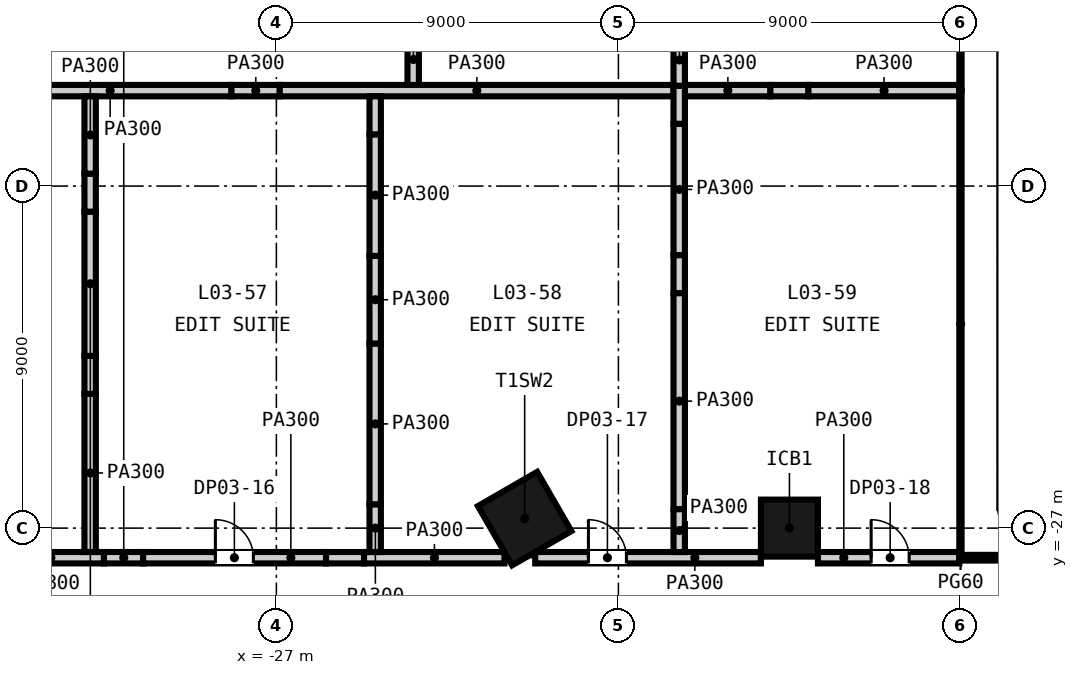
"""IFC4 building model, lengths in metres.
Left out: names, types, materials, properties, quantities, classifications, styles, units other than length and angle.
Written with IfcOpenShell. Run it as: python <this file> out.ifc"""

import sys

from ifc_helpers import new_model, si_unit, direction, frame, frame_2d, origin, origin_2d, place, context, subcontext, project, spatial, rectangle, extrude, element, fill, save


model = new_model("IFC4")
c1 = context("Model", 3, precision=1e-05, world=origin(), true_north=direction((0.0, 1.0)))
c2 = subcontext(c1, "Body", "Model", "MODEL_VIEW")
j1 = project(units=[si_unit("LENGTHUNIT", "METRE"), si_unit("PLANEANGLEUNIT", "RADIAN")], contexts=[c1])
p1 = place(None, origin())
s1 = spatial("IfcSite", under=j1, at=p1, CompositionType="ELEMENT")
p2 = place(p1, origin())
s2 = spatial("IfcBuilding", under=s1, at=p2, CompositionType="ELEMENT")
p3 = place(p2, frame((0.0, 0.0, 22.5)))
s3 = spatial("IfcBuildingStorey", under=s2, at=p3, CompositionType="ELEMENT", Elevation=22.5)
p4 = place(p3, frame((-20.467, -26.75, -0.3), z_axis=(0.0, 0.0, 1.0), x_axis=(0.5, -0.866025403784, 0.0)))
e1 = element("IfcColumn", 1, at=p4, inside=s3, PredefinedType="COLUMN", context=c2, shape_type="SweptSolid", body=[
    extrude(rectangle(XDim=1.8, YDim=1.8, at=origin_2d()), origin(), (0.0, 0.0, 1.0), 4.5),
])
p5 = place(p3, frame((-13.5, -27.0, -0.3), z_axis=(0.0, 0.0, 1.0), x_axis=(1.0, 0.0, 0.0)))
e2 = element("IfcColumn", 2, at=p5, inside=s3, PredefinedType="COLUMN", context=c2, shape_type="SweptSolid", body=[
    extrude(rectangle(XDim=1.5, YDim=1.5, at=origin_2d()), origin(), (0.0, 0.0, 1.0), 4.5),
])
p6 = place(p3, frame((-37.789, -27.779, 0.0), z_axis=(0.0, 0.0, 1.0), x_axis=(1.0, 0.0, 0.0)))
e3 = element("IfcWall", 3, at=p6, inside=s3, PredefinedType="PARTITIONING", context=c2, shape_type="SweptSolid", body=[
    extrude(rectangle(XDim=6.252, YDim=0.3, at=frame_2d((3.126, 0.0))), origin(), (0.0, 0.0, 1.0), 4.2),
])
p7 = place(p6, frame((2.4, 0.0, 0.0)))
e4 = element("IfcOpeningElement", 4, at=p7, cuts=e3, PredefinedType="OPENING", context=c2, shape_type="SweptSolid", body=[
    extrude(rectangle(XDim=1.0, YDim=2.1, at=frame_2d((0.5, 1.05))), frame((0.0, 0.16, 0.0), z_axis=(0.0, -1.0, 0.0), x_axis=(1.0, 0.0, 0.0)), (0.0, 0.0, 1.0), 0.32),
])
p8 = place(p3, frame((-31.537, -27.779, 0.0), z_axis=(0.0, 0.0, 1.0), x_axis=(1.0, 0.0, 0.0)))
e5 = element("IfcWall", 5, at=p8, inside=s3, PredefinedType="PARTITIONING", context=c2, shape_type="SweptSolid", body=[
    extrude(rectangle(XDim=1.032, YDim=0.3, at=frame_2d((0.516, 0.0))), origin(), (0.0, 0.0, 1.0), 3.111),
])
p9 = place(p3, frame((-30.505, -27.779, 0.0), z_axis=(0.0, 0.0, 1.0), x_axis=(1.0, 0.0, 0.0)))
e6 = element("IfcWall", 6, at=p9, inside=s3, PredefinedType="PARTITIONING", context=c2, shape_type="SweptSolid", body=[
    extrude(rectangle(XDim=4.812, YDim=0.3, at=frame_2d((2.406, 0.0))), origin(), (0.0, 0.0, 1.0), 4.2),
])
p10 = place(p9, frame((1.9, 0.0, 0.0)))
e7 = element("IfcOpeningElement", 7, at=p10, cuts=e6, PredefinedType="OPENING", context=c2, shape_type="SweptSolid", body=[
    extrude(rectangle(XDim=1.0, YDim=2.1, at=frame_2d((0.5, 1.05))), frame((0.0, 0.16, 0.0), z_axis=(0.0, -1.0, 0.0), x_axis=(1.0, 0.0, 0.0)), (0.0, 0.0, 1.0), 0.32),
])
p11 = place(p3, frame((-25.693, -27.779, 0.0), z_axis=(0.0, 0.0, 1.0), x_axis=(1.0, 0.0, 0.0)))
e8 = element("IfcWall", 8, at=p11, inside=s3, PredefinedType="PARTITIONING", context=c2, shape_type="SweptSolid", body=[
    extrude(rectangle(XDim=1.0, YDim=0.3, at=frame_2d((0.5, 0.0))), origin(), (0.0, 0.0, 1.0), 3.286),
])
p12 = place(p3, frame((-24.693, -27.779, 0.0), z_axis=(0.0, 0.0, 1.0), x_axis=(1.0, 0.0, 0.0)))
e9 = element("IfcWall", 9, at=p12, inside=s3, PredefinedType="PARTITIONING", context=c2, shape_type="SweptSolid", body=[
    extrude(rectangle(XDim=3.694, YDim=0.3, at=frame_2d((1.847, 0.0))), origin(), (0.0, 0.0, 1.0), 4.2),
])
p13 = place(p3, frame((-20.189, -27.779, 0.0), z_axis=(0.0, 0.0, 1.0), x_axis=(1.0, 0.0, 0.0)))
e10 = element("IfcWall", 10, at=p13, inside=s3, PredefinedType="PARTITIONING", context=c2, shape_type="SweptSolid", body=[
    extrude(rectangle(XDim=5.939, YDim=0.3, at=frame_2d((2.97, 0.0))), origin(), (0.0, 0.0, 1.0), 4.2),
])
p14 = place(p13, frame((1.4, 0.0, 0.0)))
e11 = element("IfcOpeningElement", 11, at=p14, cuts=e10, PredefinedType="OPENING", context=c2, shape_type="SweptSolid", body=[
    extrude(rectangle(XDim=1.0, YDim=2.1, at=frame_2d((0.5, 1.05))), frame((0.0, 0.16, 0.0), z_axis=(0.0, -1.0, 0.0), x_axis=(1.0, 0.0, 0.0)), (0.0, 0.0, 1.0), 0.32),
])
p15 = place(p3, frame((-12.75, -27.779, 0.0), z_axis=(0.0, 0.0, 1.0), x_axis=(1.0, 0.0, 0.0)))
e12 = element("IfcWall", 12, at=p15, inside=s3, PredefinedType="PARTITIONING", context=c2, shape_type="SweptSolid", body=[
    extrude(rectangle(XDim=3.72, YDim=0.3, at=frame_2d((1.86, 0.0))), origin(), (0.0, 0.0, 1.0), 4.2),
])
p16 = place(p15, frame((1.4, 0.0, 0.0)))
e13 = element("IfcOpeningElement", 13, at=p16, cuts=e12, PredefinedType="OPENING", context=c2, shape_type="SweptSolid", body=[
    extrude(rectangle(XDim=1.0, YDim=2.1, at=frame_2d((0.5, 1.05))), frame((0.0, 0.16, 0.0), z_axis=(0.0, -1.0, 0.0), x_axis=(1.0, 0.0, 0.0)), (0.0, 0.0, 1.0), 0.32),
])
p17 = place(p3, frame((-8.97, -27.779, 0.0), z_axis=(0.0, 0.0, 1.0), x_axis=(1.0, 0.0, 0.0)))
e14 = element("IfcWall", 14, at=p17, inside=s3, PredefinedType="PARTITIONING", context=c2, shape_type="SweptSolid", body=[
    extrude(rectangle(XDim=8.22, YDim=0.15, at=frame_2d((4.11, 0.0))), origin(), (0.0, 0.0, 1.0), 4.2),
])
p18 = place(p3, frame((-34.576, -15.489, 0.0), z_axis=(0.0, 0.0, 1.0), x_axis=(1.0, 0.0, 0.0)))
e15 = element("IfcWall", 15, at=p18, inside=s3, PredefinedType="PARTITIONING", context=c2, shape_type="SweptSolid", body=[
    extrude(rectangle(XDim=6.395, YDim=0.3, at=frame_2d((3.197, 0.0))), origin(), (0.0, 0.0, 1.0), 4.2),
])
p19 = place(p3, frame((-28.181, -15.489, 0.0), z_axis=(0.0, 0.0, 1.0), x_axis=(1.0, 0.0, 0.0)))
e16 = element("IfcWall", 16, at=p19, inside=s3, PredefinedType="PARTITIONING", context=c2, shape_type="SweptSolid", body=[
    extrude(rectangle(XDim=1.27, YDim=0.3, at=frame_2d((0.635, 0.0))), origin(), (0.0, 0.0, 1.0), 3.2),
])
p20 = place(p3, frame((-26.911, -15.489, 0.0), z_axis=(0.0, 0.0, 1.0), x_axis=(1.0, 0.0, 0.0)))
e17 = element("IfcWall", 17, at=p20, inside=s3, PredefinedType="PARTITIONING", context=c2, shape_type="SweptSolid", body=[
    extrude(rectangle(XDim=10.361, YDim=0.3, at=frame_2d((5.18, 0.0))), origin(), (0.0, 0.0, 1.0), 4.2),
])
p21 = place(p3, frame((-16.25, -15.489, 0.0), z_axis=(0.0, 0.0, 1.0), x_axis=(1.0, 0.0, 0.0)))
e18 = element("IfcWall", 18, at=p21, inside=s3, PredefinedType="PARTITIONING", context=c2, shape_type="SweptSolid", body=[
    extrude(rectangle(XDim=2.25, YDim=0.3, at=frame_2d((1.125, 0.0))), origin(), (0.0, 0.0, 1.0), 4.2),
])
p22 = place(p3, frame((-14.0, -15.489, 0.0), z_axis=(0.0, 0.0, 1.0), x_axis=(1.0, 0.0, 0.0)))
e19 = element("IfcWall", 19, at=p22, inside=s3, PredefinedType="PARTITIONING", context=c2, shape_type="SweptSolid", body=[
    extrude(rectangle(XDim=1.0, YDim=0.3, at=frame_2d((0.5, 0.0))), origin(), (0.0, 0.0, 1.0), 3.521),
])
p23 = place(p3, frame((-13.0, -15.489, 0.0), z_axis=(0.0, 0.0, 1.0), x_axis=(1.0, 0.0, 0.0)))
e20 = element("IfcWall", 20, at=p23, inside=s3, PredefinedType="PARTITIONING", context=c2, shape_type="SweptSolid", body=[
    extrude(rectangle(XDim=3.97, YDim=0.3, at=frame_2d((1.985, 0.0))), origin(), (0.0, 0.0, 1.0), 4.2),
])
p24 = place(p3, frame((-31.9, -27.629, 0.0), z_axis=(0.0, 0.0, 1.0), x_axis=(0.0, 1.0, 0.0)))
e21 = element("IfcWall", 21, at=p24, inside=s3, PredefinedType="PARTITIONING", context=c2, shape_type="SweptSolid", body=[
    extrude(rectangle(XDim=4.161, YDim=0.3, at=frame_2d((2.081, 0.0))), origin(), (0.0, 0.0, 1.0), 4.2),
])
p25 = place(p3, frame((-31.9, -23.468, 0.0), z_axis=(0.0, 0.0, 1.0), x_axis=(0.0, 1.0, 0.0)))
e22 = element("IfcWall", 22, at=p25, inside=s3, PredefinedType="PARTITIONING", context=c2, shape_type="SweptSolid", body=[
    extrude(rectangle(XDim=1.0, YDim=0.3, at=frame_2d((0.5, 0.0))), origin(), (0.0, 0.0, 1.0), 3.111),
])
p26 = place(p3, frame((-31.9, -22.468, 0.0), z_axis=(0.0, 0.0, 1.0), x_axis=(0.0, 1.0, 0.0)))
e23 = element("IfcWall", 23, at=p26, inside=s3, PredefinedType="PARTITIONING", context=c2, shape_type="SweptSolid", body=[
    extrude(rectangle(XDim=3.795, YDim=0.3, at=frame_2d((1.897, 0.0))), origin(), (0.0, 0.0, 1.0), 4.2),
])
p27 = place(p3, frame((-31.9, -18.673, 0.0), z_axis=(0.0, 0.0, 1.0), x_axis=(0.0, 1.0, 0.0)))
e24 = element("IfcWall", 24, at=p27, inside=s3, PredefinedType="PARTITIONING", context=c2, shape_type="SweptSolid", body=[
    extrude(rectangle(XDim=1.0, YDim=0.3, at=frame_2d((0.5, 0.0))), origin(), (0.0, 0.0, 1.0), 3.219),
])
p28 = place(p3, frame((-31.9, -17.673, 0.0), z_axis=(0.0, 0.0, 1.0), x_axis=(0.0, 1.0, 0.0)))
e25 = element("IfcWall", 25, at=p28, inside=s3, PredefinedType="PARTITIONING", context=c2, shape_type="SweptSolid", body=[
    extrude(rectangle(XDim=2.034, YDim=0.3, at=frame_2d((1.017, 0.0))), origin(), (0.0, 0.0, 1.0), 4.2),
])
p29 = place(p3, frame((-24.4, -27.629, 0.0), z_axis=(0.0, 0.0, 1.0), x_axis=(0.0, 1.0, 0.0)))
e26 = element("IfcWall", 26, at=p29, inside=s3, PredefinedType="PARTITIONING", context=c2, shape_type="SweptSolid", body=[
    extrude(rectangle(XDim=1.256, YDim=0.3, at=frame_2d((0.628, 0.0))), origin(), (0.0, 0.0, 1.0), 3.286),
])
p30 = place(p3, frame((-24.4, -26.373, 0.0), z_axis=(0.0, 0.0, 1.0), x_axis=(0.0, 1.0, 0.0)))
e27 = element("IfcWall", 27, at=p30, inside=s3, PredefinedType="PARTITIONING", context=c2, shape_type="SweptSolid", body=[
    extrude(rectangle(XDim=4.229, YDim=0.3, at=frame_2d((2.115, 0.0))), origin(), (0.0, 0.0, 1.0), 4.2),
])
p31 = place(p3, frame((-24.4, -22.143, 0.0), z_axis=(0.0, 0.0, 1.0), x_axis=(0.0, 1.0, 0.0)))
e28 = element("IfcWall", 28, at=p31, inside=s3, PredefinedType="PARTITIONING", context=c2, shape_type="SweptSolid", body=[
    extrude(rectangle(XDim=2.305, YDim=0.3, at=frame_2d((1.153, 0.0))), origin(), (0.0, 0.0, 1.0), 3.111),
])
p32 = place(p3, frame((-24.4, -19.838, 0.0), z_axis=(0.0, 0.0, 1.0), x_axis=(0.0, 1.0, 0.0)))
e29 = element("IfcWall", 29, at=p32, inside=s3, PredefinedType="PARTITIONING", context=c2, shape_type="SweptSolid", body=[
    extrude(rectangle(XDim=3.199, YDim=0.3, at=frame_2d((1.6, 0.0))), origin(), (0.0, 0.0, 1.0), 4.2),
])
p33 = place(p3, frame((-24.4, -16.639, 0.0), z_axis=(0.0, 0.0, 1.0), x_axis=(0.0, 1.0, 0.0)))
e30 = element("IfcWall", 30, at=p33, inside=s3, PredefinedType="PARTITIONING", context=c2, shape_type="SweptSolid", body=[
    extrude(rectangle(XDim=1.0, YDim=0.3, at=frame_2d((0.5, 0.0))), origin(), (0.0, 0.0, 1.0), 3.451),
])
p34 = place(p3, frame((-23.4, -15.339, 0.0), z_axis=(0.0, 0.0, 1.0), x_axis=(0.0, 1.0, 0.0)))
e31 = element("IfcWall", 31, at=p34, inside=s3, PredefinedType="PARTITIONING", context=c2, shape_type="SweptSolid", body=[
    extrude(rectangle(XDim=1.339, YDim=0.3, at=frame_2d((0.669, 0.0))), origin(), (0.0, 0.0, 1.0), 4.2),
])
p35 = place(p3, frame((-16.4, -27.629, 0.0), z_axis=(0.0, 0.0, 1.0), x_axis=(0.0, 1.0, 0.0)))
e32 = element("IfcWall", 32, at=p35, inside=s3, PredefinedType="PARTITIONING", context=c2, shape_type="SweptSolid", body=[
    extrude(rectangle(XDim=1.129, YDim=0.3, at=frame_2d((0.564, 0.0))), origin(), (0.0, 0.0, 1.0), 3.667),
])
p36 = place(p3, frame((-16.4, -26.5, 0.0), z_axis=(0.0, 0.0, 1.0), x_axis=(0.0, 1.0, 0.0)))
e33 = element("IfcWall", 33, at=p36, inside=s3, PredefinedType="PARTITIONING", context=c2, shape_type="SweptSolid", body=[
    extrude(rectangle(XDim=5.683, YDim=0.3, at=frame_2d((2.842, 0.0))), origin(), (0.0, 0.0, 1.0), 4.2),
])
p37 = place(p3, frame((-16.4, -20.817, 0.0), z_axis=(0.0, 0.0, 1.0), x_axis=(0.0, 1.0, 0.0)))
e34 = element("IfcWall", 34, at=p37, inside=s3, PredefinedType="PARTITIONING", context=c2, shape_type="SweptSolid", body=[
    extrude(rectangle(XDim=1.0, YDim=0.3, at=frame_2d((0.5, 0.0))), origin(), (0.0, 0.0, 1.0), 3.521),
])
p38 = place(p3, frame((-16.4, -19.817, 0.0), z_axis=(0.0, 0.0, 1.0), x_axis=(0.0, 1.0, 0.0)))
e35 = element("IfcWall", 35, at=p38, inside=s3, PredefinedType="PARTITIONING", context=c2, shape_type="SweptSolid", body=[
    extrude(rectangle(XDim=3.456, YDim=0.3, at=frame_2d((1.728, 0.0))), origin(), (0.0, 0.0, 1.0), 4.2),
])
p39 = place(p3, frame((-16.4, -16.361, 0.0), z_axis=(0.0, 0.0, 1.0), x_axis=(0.0, 1.0, 0.0)))
e36 = element("IfcWall", 36, at=p39, inside=s3, PredefinedType="PARTITIONING", context=c2, shape_type="SweptSolid", body=[
    extrude(rectangle(XDim=1.0, YDim=0.3, at=frame_2d((0.5, 0.0))), origin(), (0.0, 0.0, 1.0), 3.451),
])
p40 = place(p3, frame((-16.4, -15.361, 0.0), z_axis=(0.0, 0.0, 1.0), x_axis=(0.0, 1.0, 0.0)))
e37 = element("IfcWall", 37, at=p40, inside=s3, PredefinedType="PARTITIONING", context=c2, shape_type="SweptSolid", body=[
    extrude(rectangle(XDim=1.361, YDim=0.3, at=frame_2d((0.681, 0.0))), origin(), (0.0, 0.0, 1.0), 4.2),
])
p41 = place(p3, frame((-9.0, -27.778, 0.0), z_axis=(0.0, 0.0, 1.0), x_axis=(0.0, 1.0, 0.0)))
e38 = element("IfcWall", 38, at=p41, inside=s3, PredefinedType="PARTITIONING", context=c2, shape_type="SweptSolid", body=[
    extrude(rectangle(XDim=12.288, YDim=0.06, at=frame_2d((6.144, 0.0))), origin(), (0.0, 0.0, 1.0), 4.2),
])
p42 = place(p3, frame((-9.0, -15.489, 0.0), z_axis=(0.0, 0.0, 1.0), x_axis=(0.0, 1.0, 0.0)))
e39 = element("IfcWall", 39, at=p42, inside=s3, PredefinedType="PARTITIONING", context=c2, shape_type="SweptSolid", body=[
    extrude(rectangle(XDim=6.488, YDim=0.06, at=frame_2d((3.244, 0.0))), origin(), (0.0, 0.0, 1.0), 4.2),
])
p43 = place(p10, origin())
e40 = element("IfcDoor", 40, at=p43, inside=s3, OperationType="SINGLE_SWING_LEFT", PredefinedType="DOOR", context=c2, shape_type="SweptSolid", body=[
    extrude(rectangle(XDim=1.0, YDim=2.1, at=frame_2d((0.5, 1.05))), frame((0.0, 0.025, 0.0), z_axis=(0.0, -1.0, 0.0), x_axis=(1.0, 0.0, 0.0)), (0.0, 0.0, 1.0), 0.05),
])
fill(e7, e40)
p44 = place(p14, origin())
e41 = element("IfcDoor", 41, at=p44, inside=s3, OperationType="SINGLE_SWING_LEFT", PredefinedType="DOOR", context=c2, shape_type="SweptSolid", body=[
    extrude(rectangle(XDim=1.0, YDim=2.1, at=frame_2d((0.5, 1.05))), frame((0.0, 0.025, 0.0), z_axis=(0.0, -1.0, 0.0), x_axis=(1.0, 0.0, 0.0)), (0.0, 0.0, 1.0), 0.05),
])
fill(e11, e41)
p45 = place(p16, origin())
e42 = element("IfcDoor", 42, at=p45, inside=s3, OperationType="SINGLE_SWING_LEFT", PredefinedType="DOOR", context=c2, shape_type="SweptSolid", body=[
    extrude(rectangle(XDim=1.0, YDim=2.1, at=frame_2d((0.5, 1.05))), frame((0.0, 0.025, 0.0), z_axis=(0.0, -1.0, 0.0), x_axis=(1.0, 0.0, 0.0)), (0.0, 0.0, 1.0), 0.05),
])
fill(e13, e42)
save(model, sys.argv[1])
